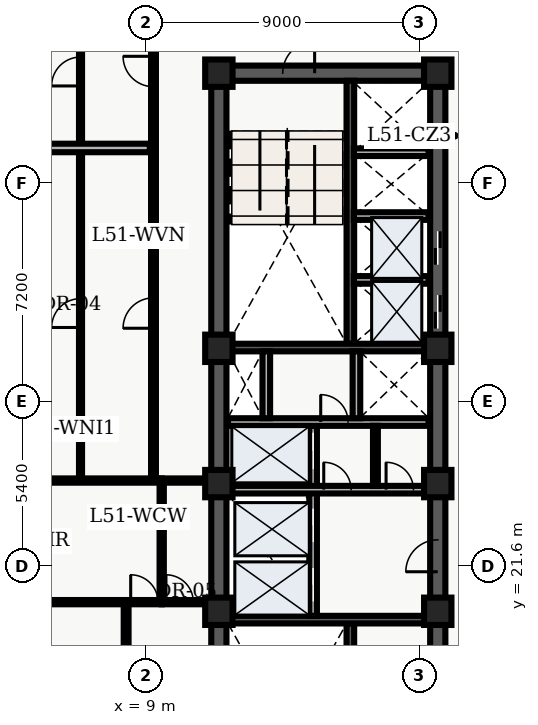
"""IFC4 building model, lengths in metres.
Left out: names, types, materials, properties, quantities, classifications, styles, units other than length and angle.
Written with IfcOpenShell. Run it as: python <this file> out.ifc"""

import sys

from ifc_helpers import new_model, entity, si_unit, converted_unit, direction, frame, origin_with_axes, origin_2d_with_axis, place, context, subcontext, project, spatial, polyline, rectangle, outline, extrude, element, fill, save


model = new_model("IFC4")
c1 = context("Model", 3, precision=1e-05, world=origin_with_axes(), true_north=direction((0.0, 1.0)))
c2 = subcontext(c1, "Body", "Model", "MODEL_VIEW")
j1 = project(units=[si_unit("LENGTHUNIT", "METRE"), converted_unit("PLANEANGLEUNIT", "DEGREE", entity("IfcPlaneAngleMeasure", 0.017), si_unit("PLANEANGLEUNIT", "RADIAN"), dimensions=[0, 0, 0, 0, 0, 0, 0])], contexts=[c1])
p1 = place(None, origin_with_axes())
s1 = spatial("IfcSite", under=j1, at=p1, CompositionType="ELEMENT")
p2 = place(p1, origin_with_axes())
s2 = spatial("IfcBuilding", under=s1, at=p2, CompositionType="ELEMENT")
p3 = place(p2, frame((0.0, 0.0, 208.2), z_axis=(0.0, 0.0, 1.0), x_axis=(1.0, 0.0, 0.0)))
s3 = spatial("IfcBuildingStorey", under=s2, at=p3, CompositionType="ELEMENT", Elevation=208.2)
p4 = place(p3, frame((11.4, 10.8, 0.0), z_axis=(0.0, 0.0, 1.0), x_axis=(0.0, 1.0, 0.0)))
e1 = element("IfcWall", 1, at=p4, inside=s3, PredefinedType="SHEAR", context=c2, shape_type="SweptSolid", body=[
    extrude(outline(polyline([(0.0, -0.25), (27.0, -0.25), (27.0, 0.25), (0.0, 0.25), (0.0, -0.25)])), origin_with_axes(), (0.0, 0.0, 1.0), 3.66),
])
p5 = place(p3, frame((11.4, 37.8, 0.0), z_axis=(0.0, 0.0, 1.0), x_axis=(1.0, 0.0, 0.0)))
e2 = element("IfcWall", 2, at=p5, inside=s3, PredefinedType="SHEAR", context=c2, shape_type="SweptSolid", body=[
    extrude(outline(polyline([(0.0, -0.25), (7.2, -0.25), (7.2, 0.25), (0.0, 0.25), (0.0, -0.25)])), origin_with_axes(), (0.0, 0.0, 1.0), 3.66),
])
p6 = place(p5, frame((2.625, 0.0, 0.0), z_axis=(0.0, 0.0, 1.0), x_axis=(1.0, 0.0, 0.0)))
e3 = element("IfcOpeningElement", 3, at=p6, cuts=e2, PredefinedType="OPENING", context=c2, shape_type="SweptSolid", body=[
    extrude(rectangle(XDim=1.05, YDim=0.52, at=origin_2d_with_axis()), origin_with_axes(), (0.0, 0.0, 1.0), 2.15),
])
p7 = place(p3, frame((18.6, 10.8, 0.0), z_axis=(0.0, 0.0, 1.0), x_axis=(0.0, 1.0, 0.0)))
e4 = element("IfcWall", 4, at=p7, inside=s3, PredefinedType="SHEAR", context=c2, shape_type="SweptSolid", body=[
    extrude(outline(polyline([(0.0, -0.25), (13.5, -0.25), (13.5, 0.25), (0.0, 0.25), (0.0, -0.25)])), origin_with_axes(), (0.0, 0.0, 1.0), 3.66),
])
p8 = place(p7, frame((11.125, 0.0, 0.0), z_axis=(0.0, 0.0, 1.0), x_axis=(1.0, 0.0, 0.0)))
e5 = element("IfcOpeningElement", 5, at=p8, cuts=e4, PredefinedType="OPENING", context=c2, shape_type="SweptSolid", body=[
    extrude(rectangle(XDim=1.05, YDim=0.52, at=origin_2d_with_axis()), origin_with_axes(), (0.0, 0.0, 1.0), 2.15),
])
p9 = place(p7, frame((2.425, 0.0, 0.0), z_axis=(0.0, 0.0, 1.0), x_axis=(1.0, 0.0, 0.0)))
e6 = element("IfcOpeningElement", 6, at=p9, cuts=e4, PredefinedType="OPENING", context=c2, shape_type="SweptSolid", body=[
    extrude(rectangle(XDim=1.05, YDim=0.52, at=origin_2d_with_axis()), origin_with_axes(), (0.0, 0.0, 1.0), 2.15),
])
p10 = place(p7, frame((6.725, 0.0, 0.0), z_axis=(0.0, 0.0, 1.0), x_axis=(1.0, 0.0, 0.0)))
e7 = element("IfcOpeningElement", 7, at=p10, cuts=e4, PredefinedType="OPENING", context=c2, shape_type="SweptSolid", body=[
    extrude(rectangle(XDim=1.05, YDim=0.52, at=origin_2d_with_axis()), origin_with_axes(), (0.0, 0.0, 1.0), 2.15),
])
p11 = place(p3, frame((18.6, 24.3, 0.0), z_axis=(0.0, 0.0, 1.0), x_axis=(0.0, 1.0, 0.0)))
e8 = element("IfcWall", 8, at=p11, inside=s3, PredefinedType="SHEAR", context=c2, shape_type="SweptSolid", body=[
    extrude(outline(polyline([(0.0, -0.25), (13.5, -0.25), (13.5, 0.25), (0.0, 0.25), (0.0, -0.25)])), origin_with_axes(), (0.0, 0.0, 1.0), 3.66),
])
p12 = place(p11, frame((5.65, 0.0, 0.0), z_axis=(0.0, 0.0, 1.0), x_axis=(1.0, 0.0, 0.0)))
e9 = element("IfcOpeningElement", 9, at=p12, cuts=e8, PredefinedType="OPENING", context=c2, shape_type="SweptSolid", body=[
    extrude(rectangle(XDim=1.1, YDim=0.52, at=origin_2d_with_axis()), origin_with_axes(), (0.0, 0.0, 1.0), 2.15),
])
p13 = place(p11, frame((7.75, 0.0, 0.0), z_axis=(0.0, 0.0, 1.0), x_axis=(1.0, 0.0, 0.0)))
e10 = element("IfcOpeningElement", 10, at=p13, cuts=e8, PredefinedType="OPENING", context=c2, shape_type="SweptSolid", body=[
    extrude(rectangle(XDim=1.1, YDim=0.52, at=origin_2d_with_axis()), origin_with_axes(), (0.0, 0.0, 1.0), 2.15),
])
p14 = place(p3, frame((15.725, 11.05, 0.0), z_axis=(0.0, 0.0, 1.0), x_axis=(0.0, 1.0, 0.0)))
e11 = element("IfcWall", 11, at=p14, inside=s3, PredefinedType="SHEAR", context=c2, shape_type="SweptSolid", body=[
    extrude(outline(polyline([(0.0, -0.125), (8.65, -0.125), (8.65, 0.125), (0.0, 0.125), (0.0, -0.125)])), origin_with_axes(), (0.0, 0.0, 1.0), 3.66),
])
p15 = place(p3, frame((11.65, 19.825, 0.0), z_axis=(0.0, 0.0, 1.0), x_axis=(1.0, 0.0, 0.0)))
e12 = element("IfcWall", 12, at=p15, inside=s3, PredefinedType="SHEAR", context=c2, shape_type="SweptSolid", body=[
    extrude(outline(polyline([(0.0, -0.125), (6.7, -0.125), (6.7, 0.125), (0.0, 0.125), (0.0, -0.125)])), origin_with_axes(), (0.0, 0.0, 1.0), 3.66),
])
p16 = place(p3, frame((15.725, 28.9, 0.0), z_axis=(0.0, 0.0, 1.0), x_axis=(0.0, 1.0, 0.0)))
e13 = element("IfcWall", 13, at=p16, inside=s3, PredefinedType="SHEAR", context=c2, shape_type="SweptSolid", body=[
    extrude(outline(polyline([(0.0, -0.125), (8.65, -0.125), (8.65, 0.125), (0.0, 0.125), (0.0, -0.125)])), origin_with_axes(), (0.0, 0.0, 1.0), 3.66),
])
p17 = place(p3, frame((11.65, 28.775, 0.0), z_axis=(0.0, 0.0, 1.0), x_axis=(1.0, 0.0, 0.0)))
e14 = element("IfcWall", 14, at=p17, inside=s3, PredefinedType="SHEAR", context=c2, shape_type="SweptSolid", body=[
    extrude(outline(polyline([(0.0, -0.125), (6.7, -0.125), (6.7, 0.125), (0.0, 0.125), (0.0, -0.125)])), origin_with_axes(), (0.0, 0.0, 1.0), 3.66),
])
p18 = place(p3, frame((14.5, 19.95, 0.0), z_axis=(0.0, 0.0, 1.0), x_axis=(0.0, 1.0, 0.0)))
e15 = element("IfcWall", 15, at=p18, inside=s3, PredefinedType="SOLIDWALL", context=c2, shape_type="SweptSolid", body=[
    extrude(outline(polyline([(0.0, -0.125), (6.25, -0.125), (6.25, 0.125), (0.0, 0.125), (0.0, -0.125)])), origin_with_axes(), (0.0, 0.0, 1.0), 2.7),
])
p19 = place(p18, frame((1.025, 0.0, 0.0), z_axis=(0.0, 0.0, 1.0), x_axis=(1.0, 0.0, 0.0)))
e16 = element("IfcOpeningElement", 16, at=p19, cuts=e15, PredefinedType="OPENING", context=c2, shape_type="SweptSolid", body=[
    extrude(rectangle(XDim=1.1, YDim=0.27, at=origin_2d_with_axis()), origin_with_axes(), (0.0, 0.0, 1.0), 2.15),
])
p20 = place(p18, frame((2.975, 0.0, 0.0), z_axis=(0.0, 0.0, 1.0), x_axis=(1.0, 0.0, 0.0)))
e17 = element("IfcOpeningElement", 17, at=p20, cuts=e15, PredefinedType="OPENING", context=c2, shape_type="SweptSolid", body=[
    extrude(rectangle(XDim=1.1, YDim=0.27, at=origin_2d_with_axis()), origin_with_axes(), (0.0, 0.0, 1.0), 2.15),
])
p21 = place(p18, frame((5.425, 0.0, 0.0), z_axis=(0.0, 0.0, 1.0), x_axis=(1.0, 0.0, 0.0)))
e18 = element("IfcOpeningElement", 18, at=p21, cuts=e15, PredefinedType="OPENING", context=c2, shape_type="SweptSolid", body=[
    extrude(rectangle(XDim=1.2, YDim=0.27, at=origin_2d_with_axis()), origin_with_axes(), (0.0, 0.0, 1.0), 2.15),
])
p22 = place(p3, frame((11.7, 24.1, 0.0), z_axis=(0.0, 0.0, 1.0), x_axis=(1.0, 0.0, 0.0)))
e19 = element("IfcWall", 19, at=p22, inside=s3, PredefinedType="SOLIDWALL", context=c2, shape_type="SweptSolid", body=[
    extrude(outline(polyline([(0.0, -0.125), (6.6, -0.125), (6.6, 0.125), (0.0, 0.125), (0.0, -0.125)])), origin_with_axes(), (0.0, 0.0, 1.0), 2.7),
])
p23 = place(p22, frame((3.6, 0.0, 0.0), z_axis=(0.0, 0.0, 1.0), x_axis=(1.0, 0.0, 0.0)))
e20 = element("IfcOpeningElement", 20, at=p23, cuts=e19, PredefinedType="OPENING", context=c2, shape_type="SweptSolid", body=[
    extrude(rectangle(XDim=0.9, YDim=0.27, at=origin_2d_with_axis()), origin_with_axes(), (0.0, 0.0, 1.0), 2.15),
])
p24 = place(p22, frame((5.65, 0.0, 0.0), z_axis=(0.0, 0.0, 1.0), x_axis=(1.0, 0.0, 0.0)))
e21 = element("IfcOpeningElement", 21, at=p24, cuts=e19, PredefinedType="OPENING", context=c2, shape_type="SweptSolid", body=[
    extrude(rectangle(XDim=0.9, YDim=0.27, at=origin_2d_with_axis()), origin_with_axes(), (0.0, 0.0, 1.0), 2.15),
])
p25 = place(p3, frame((11.7, 26.325, 0.0), z_axis=(0.0, 0.0, 1.0), x_axis=(1.0, 0.0, 0.0)))
e22 = element("IfcWall", 22, at=p25, inside=s3, PredefinedType="SOLIDWALL", context=c2, shape_type="SweptSolid", body=[
    extrude(outline(polyline([(0.0, -0.125), (6.6, -0.125), (6.6, 0.125), (0.0, 0.125), (0.0, -0.125)])), origin_with_axes(), (0.0, 0.0, 1.0), 2.7),
])
p26 = place(p25, frame((3.5, 0.0, 0.0), z_axis=(0.0, 0.0, 1.0), x_axis=(1.0, 0.0, 0.0)))
e23 = element("IfcOpeningElement", 23, at=p26, cuts=e22, PredefinedType="OPENING", context=c2, shape_type="SweptSolid", body=[
    extrude(rectangle(XDim=0.9, YDim=0.27, at=origin_2d_with_axis()), origin_with_axes(), (0.0, 0.0, 1.0), 2.15),
])
for number, where, z_axis, x_axis in (
    (24, (12.96, 26.45, 0.0), (0.0, 0.0, 1.0), (0.0, 1.0, 0.0)),
    (25, (15.925, 26.45, 0.0), (0.0, 0.0, 1.0), (0.0, 1.0, 0.0)),
):
    element("IfcWall", number, at=place(p3, frame(where, z_axis=z_axis, x_axis=x_axis)), inside=s3, PredefinedType="SOLIDWALL", context=c2, shape_type="SweptSolid", body=[
        extrude(outline(polyline([(0.0, -0.125), (2.2, -0.125), (2.2, 0.125), (0.0, 0.125), (0.0, -0.125)])), origin_with_axes(), (0.0, 0.0, 1.0), 2.7),
    ])
for number, where, z_axis, x_axis in (
    (26, (11.4, 20.1, 0.0), (0.0, 0.0, 1.0), (1.0, 0.0, 0.0)),
    (27, (11.4, 24.3, 0.0), (0.0, 0.0, 1.0), (1.0, 0.0, 0.0)),
    (28, (11.4, 28.75, 0.0), (0.0, 0.0, 1.0), (1.0, 0.0, 0.0)),
    (29, (11.4, 37.8, 0.0), (0.0, 0.0, 1.0), (1.0, 0.0, 0.0)),
    (30, (18.6, 20.1, 0.0), (0.0, 0.0, 1.0), (1.0, 0.0, 0.0)),
    (31, (18.6, 24.3, 0.0), (0.0, 0.0, 1.0), (1.0, 0.0, 0.0)),
    (32, (18.6, 28.75, 0.0), (0.0, 0.0, 1.0), (1.0, 0.0, 0.0)),
    (33, (18.6, 37.8, 0.0), (0.0, 0.0, 1.0), (1.0, 0.0, 0.0)),
):
    element("IfcColumn", number, at=place(p3, frame(where, z_axis=z_axis, x_axis=x_axis)), inside=s3, PredefinedType="COLUMN", context=c2, shape_type="SweptSolid", body=[
        extrude(rectangle(XDim=0.9, YDim=0.9, at=origin_2d_with_axis()), origin_with_axes(), (0.0, 0.0, 1.0), 3.9),
    ])
p27 = place(p3, frame((16.55, 24.22, 0.0), z_axis=(0.0, 0.0, 1.0), x_axis=(0.0, 1.0, 0.0)))
e34 = element("IfcWall", 34, at=p27, inside=s3, PredefinedType="PARTITIONING", context=c2, shape_type="SweptSolid", body=[
    extrude(outline(polyline([(0.0, -0.08), (1.98, -0.08), (1.98, 0.08), (0.0, 0.08), (0.0, -0.08)])), origin_with_axes(), (0.0, 0.0, 1.0), 2.7),
])
for number, where, z_axis, x_axis in (
    (35, (15.84, 31.0, 0.0), (0.0, 0.0, 1.0), (1.0, 0.0, 0.0)),
    (36, (15.84, 33.1, 0.0), (0.0, 0.0, 1.0), (1.0, 0.0, 0.0)),
    (37, (15.84, 35.2, 0.0), (0.0, 0.0, 1.0), (1.0, 0.0, 0.0)),
):
    element("IfcWall", number, at=place(p3, frame(where, z_axis=z_axis, x_axis=x_axis)), inside=s3, PredefinedType="SOLIDWALL", context=c2, shape_type="SweptSolid", body=[
        extrude(outline(polyline([(0.0, -0.125), (2.46, -0.125), (2.46, 0.125), (0.0, 0.125), (0.0, -0.125)])), origin_with_axes(), (0.0, 0.0, 1.0), 2.7),
    ])
p28 = place(p3, frame((9.52, 20.4, 0.0), z_axis=(0.0, 0.0, 1.0), x_axis=(0.0, 1.0, 0.0)))
e38 = element("IfcWall", 38, at=p28, inside=s3, PredefinedType="PARTITIONING", context=c2, shape_type="SweptSolid", body=[
    extrude(outline(polyline([(0.0, -0.07), (4.0, -0.07), (4.0, 0.07), (0.0, 0.07), (0.0, -0.07)])), origin_with_axes(), (0.0, 0.0, 1.0), 2.7),
])
p29 = place(p3, frame((9.52, 20.4, 0.0), z_axis=(0.0, 0.0, 1.0), x_axis=(1.0, 0.0, 0.0)))
e39 = element("IfcWall", 39, at=p29, inside=s3, PredefinedType="PARTITIONING", context=c2, shape_type="SweptSolid", body=[
    extrude(outline(polyline([(0.0, -0.07), (1.58, -0.07), (1.58, 0.07), (0.0, 0.07), (0.0, -0.07)])), origin_with_axes(), (0.0, 0.0, 1.0), 2.7),
])
p30 = place(p29, frame((0.59, 0.0, 0.0), z_axis=(0.0, 0.0, 1.0), x_axis=(1.0, 0.0, 0.0)))
e40 = element("IfcOpeningElement", 40, at=p30, cuts=e39, PredefinedType="OPENING", context=c2, shape_type="SweptSolid", body=[
    extrude(rectangle(XDim=0.9, YDim=0.16, at=origin_2d_with_axis()), origin_with_axes(), (0.0, 0.0, 1.0), 2.15),
])
p31 = place(p3, frame((9.52, 24.4, 0.0), z_axis=(0.0, 0.0, 1.0), x_axis=(1.0, 0.0, 0.0)))
e41 = element("IfcWall", 41, at=p31, inside=s3, PredefinedType="PARTITIONING", context=c2, shape_type="SweptSolid", body=[
    extrude(outline(polyline([(0.0, -0.07), (1.58, -0.07), (1.58, 0.07), (0.0, 0.07), (0.0, -0.07)])), origin_with_axes(), (0.0, 0.0, 1.0), 2.7),
])
p32 = place(p3, frame((8.35, 7.8, 0.0), z_axis=(0.0, 0.0, 1.0), x_axis=(0.0, 1.0, 0.0)))
e42 = element("IfcWall", 42, at=p32, inside=s3, PredefinedType="PARTITIONING", context=c2, shape_type="SweptSolid", body=[
    extrude(outline(polyline([(0.0, -0.08), (12.6, -0.08), (12.6, 0.08), (0.0, 0.08), (0.0, -0.08)])), origin_with_axes(), (0.0, 0.0, 1.0), 2.7),
])
p33 = place(p32, frame((2.92, 0.0, 0.0), z_axis=(0.0, 0.0, 1.0), x_axis=(1.0, 0.0, 0.0)))
e43 = element("IfcOpeningElement", 43, at=p33, cuts=e42, PredefinedType="OPENING", context=c2, shape_type="SweptSolid", body=[
    extrude(rectangle(XDim=1.0, YDim=0.18, at=origin_2d_with_axis()), origin_with_axes(), (0.0, 0.0, 1.0), 2.15),
])
p34 = place(p32, frame((9.115, 0.0, 0.0), z_axis=(0.0, 0.0, 1.0), x_axis=(1.0, 0.0, 0.0)))
e44 = element("IfcOpeningElement", 44, at=p34, cuts=e42, PredefinedType="OPENING", context=c2, shape_type="SweptSolid", body=[
    extrude(rectangle(XDim=1.0, YDim=0.18, at=origin_2d_with_axis()), origin_with_axes(), (0.0, 0.0, 1.0), 2.15),
])
p35 = place(p3, frame((9.25, 24.4, 0.0), z_axis=(0.0, 0.0, 1.0), x_axis=(0.0, 1.0, 0.0)))
e45 = element("IfcWall", 45, at=p35, inside=s3, PredefinedType="PARTITIONING", context=c2, shape_type="SweptSolid", body=[
    extrude(outline(polyline([(0.0, -0.08), (16.1, -0.08), (16.1, 0.08), (0.0, 0.08), (0.0, -0.08)])), origin_with_axes(), (0.0, 0.0, 1.0), 2.7),
])
p36 = place(p35, frame((5.51, 0.0, 0.0), z_axis=(0.0, 0.0, 1.0), x_axis=(1.0, 0.0, 0.0)))
e46 = element("IfcOpeningElement", 46, at=p36, cuts=e45, PredefinedType="OPENING", context=c2, shape_type="SweptSolid", body=[
    extrude(rectangle(XDim=1.0, YDim=0.18, at=origin_2d_with_axis()), origin_with_axes(), (0.0, 0.0, 1.0), 2.15),
])
p37 = place(p35, frame((13.455, 0.0, 0.0), z_axis=(0.0, 0.0, 1.0), x_axis=(1.0, 0.0, 0.0)))
e47 = element("IfcOpeningElement", 47, at=p37, cuts=e45, PredefinedType="OPENING", context=c2, shape_type="SweptSolid", body=[
    extrude(rectangle(XDim=1.0, YDim=0.18, at=origin_2d_with_axis()), origin_with_axes(), (0.0, 0.0, 1.0), 2.15),
])
p38 = place(p3, frame((0.335, 20.4, 0.0), z_axis=(0.0, 0.0, 1.0), x_axis=(1.0, 0.0, 0.0)))
e48 = element("IfcWall", 48, at=p38, inside=s3, PredefinedType="PARTITIONING", context=c2, shape_type="SweptSolid", body=[
    extrude(outline(polyline([(0.0, -0.07), (9.185, -0.07), (9.185, 0.07), (0.0, 0.07), (0.0, -0.07)])), origin_with_axes(), (0.0, 0.0, 1.0), 2.7),
])
p39 = place(p38, frame((8.615, 0.0, 0.0), z_axis=(0.0, 0.0, 1.0), x_axis=(1.0, 0.0, 0.0)))
e49 = element("IfcOpeningElement", 49, at=p39, cuts=e48, PredefinedType="OPENING", context=c2, shape_type="SweptSolid", body=[
    extrude(rectangle(XDim=0.9, YDim=0.16, at=origin_2d_with_axis()), origin_with_axes(), (0.0, 0.0, 1.0), 2.15),
])
p40 = place(p3, frame((0.335, 24.4, 0.0), z_axis=(0.0, 0.0, 1.0), x_axis=(1.0, 0.0, 0.0)))
e50 = element("IfcWall", 50, at=p40, inside=s3, PredefinedType="PARTITIONING", context=c2, shape_type="SweptSolid", body=[
    extrude(outline(polyline([(0.0, -0.07), (9.185, -0.07), (9.185, 0.07), (0.0, 0.07), (0.0, -0.07)])), origin_with_axes(), (0.0, 0.0, 1.0), 2.7),
])
p41 = place(p3, frame((6.85, 24.55, 0.0), z_axis=(0.0, 0.0, 1.0), x_axis=(0.0, 1.0, 0.0)))
e51 = element("IfcWall", 51, at=p41, inside=s3, PredefinedType="PARTITIONING", context=c2, shape_type="SweptSolid", body=[
    extrude(outline(polyline([(0.0, -0.05), (15.75, -0.05), (15.75, 0.05), (0.0, 0.05), (0.0, -0.05)])), origin_with_axes(), (0.0, 0.0, 1.0), 2.7),
])
p42 = place(p41, frame((5.36, 0.0, 0.0), z_axis=(0.0, 0.0, 1.0), x_axis=(1.0, 0.0, 0.0)))
e52 = element("IfcOpeningElement", 52, at=p42, cuts=e51, PredefinedType="OPENING", context=c2, shape_type="SweptSolid", body=[
    extrude(rectangle(XDim=0.95, YDim=0.12, at=origin_2d_with_axis()), origin_with_axes(), (0.0, 0.0, 1.0), 2.15),
])
p43 = place(p41, frame((13.305, 0.0, 0.0), z_axis=(0.0, 0.0, 1.0), x_axis=(1.0, 0.0, 0.0)))
e53 = element("IfcOpeningElement", 53, at=p43, cuts=e51, PredefinedType="OPENING", context=c2, shape_type="SweptSolid", body=[
    extrude(rectangle(XDim=0.95, YDim=0.12, at=origin_2d_with_axis()), origin_with_axes(), (0.0, 0.0, 1.0), 2.15),
])
p44 = place(p3, frame((0.335, 35.34, 0.0), z_axis=(0.0, 0.0, 1.0), x_axis=(1.0, 0.0, 0.0)))
e54 = element("IfcWall", 54, at=p44, inside=s3, PredefinedType="PARTITIONING", context=c2, shape_type="SweptSolid", body=[
    extrude(outline(polyline([(0.0, -0.14), (8.795, -0.14), (8.795, 0.14), (0.0, 0.14), (0.0, -0.14)])), origin_with_axes(), (0.0, 0.0, 1.0), 2.7),
])
p45 = place(p11, frame((5.65, 0.0, 0.0), z_axis=(0.0, 0.0, 1.0), x_axis=(1.0, 0.0, 0.0)))
e55 = element("IfcDoor", 55, at=p45, inside=s3, OperationType="SLIDING_TO_LEFT", PredefinedType="DOOR", context=c2, shape_type="SweptSolid", body=[
    extrude(rectangle(XDim=1.1, YDim=0.09, at=origin_2d_with_axis()), origin_with_axes(), (0.0, 0.0, 1.0), 2.15),
])
fill(e9, e55)
p46 = place(p11, frame((7.75, 0.0, 0.0), z_axis=(0.0, 0.0, 1.0), x_axis=(1.0, 0.0, 0.0)))
e56 = element("IfcDoor", 56, at=p46, inside=s3, OperationType="SLIDING_TO_RIGHT", PredefinedType="DOOR", context=c2, shape_type="SweptSolid", body=[
    extrude(rectangle(XDim=1.1, YDim=0.09, at=origin_2d_with_axis()), origin_with_axes(), (0.0, 0.0, 1.0), 2.15),
])
fill(e10, e56)
p47 = place(p18, frame((1.025, 0.0, 0.0), z_axis=(0.0, 0.0, 1.0), x_axis=(1.0, 0.0, 0.0)))
e57 = element("IfcDoor", 57, at=p47, inside=s3, OperationType="SLIDING_TO_LEFT", PredefinedType="DOOR", context=c2, shape_type="SweptSolid", body=[
    extrude(rectangle(XDim=1.1, YDim=0.09, at=origin_2d_with_axis()), origin_with_axes(), (0.0, 0.0, 1.0), 2.15),
])
fill(e16, e57)
p48 = place(p18, frame((2.975, 0.0, 0.0), z_axis=(0.0, 0.0, 1.0), x_axis=(1.0, 0.0, 0.0)))
e58 = element("IfcDoor", 58, at=p48, inside=s3, OperationType="SLIDING_TO_RIGHT", PredefinedType="DOOR", context=c2, shape_type="SweptSolid", body=[
    extrude(rectangle(XDim=1.1, YDim=0.09, at=origin_2d_with_axis()), origin_with_axes(), (0.0, 0.0, 1.0), 2.15),
])
fill(e17, e58)
p49 = place(p18, frame((5.425, 0.0, 0.0), z_axis=(0.0, 0.0, 1.0), x_axis=(1.0, 0.0, 0.0)))
e59 = element("IfcDoor", 59, at=p49, inside=s3, OperationType="DOUBLE_DOOR_SLIDING", PredefinedType="DOOR", context=c2, shape_type="SweptSolid", body=[
    extrude(rectangle(XDim=1.2, YDim=0.09, at=origin_2d_with_axis()), origin_with_axes(), (0.0, 0.0, 1.0), 2.15),
])
fill(e18, e59)
p50 = place(p5, frame((2.625, 0.0, 0.0), z_axis=(0.0, 0.0, 1.0), x_axis=(1.0, 0.0, 0.0)))
e60 = element("IfcDoor", 60, at=p50, inside=s3, OperationType="SINGLE_SWING_RIGHT", PredefinedType="DOOR", context=c2, shape_type="SweptSolid", body=[
    extrude(rectangle(XDim=1.05, YDim=0.09, at=origin_2d_with_axis()), origin_with_axes(), (0.0, 0.0, 1.0), 2.15),
])
fill(e3, e60)
p51 = place(p7, frame((11.125, 0.0, 0.0), z_axis=(0.0, 0.0, 1.0), x_axis=(1.0, 0.0, 0.0)))
e61 = element("IfcDoor", 61, at=p51, inside=s3, OperationType="SINGLE_SWING_LEFT", PredefinedType="DOOR", context=c2, shape_type="SweptSolid", body=[
    extrude(rectangle(XDim=1.05, YDim=0.09, at=origin_2d_with_axis()), origin_with_axes(), (0.0, 0.0, 1.0), 2.15),
])
fill(e5, e61)
p52 = place(p22, frame((3.6, 0.0, 0.0), z_axis=(0.0, 0.0, 1.0), x_axis=(1.0, 0.0, 0.0)))
e62 = element("IfcDoor", 62, at=p52, inside=s3, OperationType="SINGLE_SWING_LEFT", PredefinedType="DOOR", context=c2, shape_type="SweptSolid", body=[
    extrude(rectangle(XDim=0.9, YDim=0.09, at=origin_2d_with_axis()), origin_with_axes(), (0.0, 0.0, 1.0), 2.15),
])
fill(e20, e62)
p53 = place(p22, frame((5.65, 0.0, 0.0), z_axis=(0.0, 0.0, 1.0), x_axis=(1.0, 0.0, 0.0)))
e63 = element("IfcDoor", 63, at=p53, inside=s3, OperationType="SINGLE_SWING_LEFT", PredefinedType="DOOR", context=c2, shape_type="SweptSolid", body=[
    extrude(rectangle(XDim=0.9, YDim=0.09, at=origin_2d_with_axis()), origin_with_axes(), (0.0, 0.0, 1.0), 2.15),
])
fill(e21, e63)
p54 = place(p25, frame((3.5, 0.0, 0.0), z_axis=(0.0, 0.0, 1.0), x_axis=(1.0, 0.0, 0.0)))
e64 = element("IfcDoor", 64, at=p54, inside=s3, OperationType="SINGLE_SWING_LEFT", PredefinedType="DOOR", context=c2, shape_type="SweptSolid", body=[
    extrude(rectangle(XDim=0.9, YDim=0.09, at=origin_2d_with_axis()), origin_with_axes(), (0.0, 0.0, 1.0), 2.15),
])
fill(e23, e64)
p55 = place(p29, frame((0.59, 0.0, 0.0), z_axis=(0.0, 0.0, 1.0), x_axis=(1.0, 0.0, 0.0)))
e65 = element("IfcDoor", 65, at=p55, inside=s3, OperationType="SINGLE_SWING_LEFT", PredefinedType="DOOR", context=c2, shape_type="SweptSolid", body=[
    extrude(rectangle(XDim=0.9, YDim=0.084, at=origin_2d_with_axis()), origin_with_axes(), (0.0, 0.0, 1.0), 2.15),
])
fill(e40, e65)
p56 = place(p38, frame((8.615, 0.0, 0.0), z_axis=(0.0, 0.0, 1.0), x_axis=(1.0, 0.0, 0.0)))
e66 = element("IfcDoor", 66, at=p56, inside=s3, OperationType="SINGLE_SWING_LEFT", PredefinedType="DOOR", context=c2, shape_type="SweptSolid", body=[
    extrude(rectangle(XDim=0.9, YDim=0.084, at=origin_2d_with_axis()), origin_with_axes(), (0.0, 0.0, 1.0), 2.15),
])
fill(e49, e66)
p57 = place(p41, frame((5.36, 0.0, 0.0), z_axis=(0.0, 0.0, 1.0), x_axis=(1.0, 0.0, 0.0)))
e67 = element("IfcDoor", 67, at=p57, inside=s3, OperationType="SINGLE_SWING_LEFT", PredefinedType="DOOR", context=c2, shape_type="SweptSolid", body=[
    extrude(rectangle(XDim=0.95, YDim=0.06, at=origin_2d_with_axis()), origin_with_axes(), (0.0, 0.0, 1.0), 2.15),
])
fill(e52, e67)
p58 = place(p35, frame((5.51, 0.0, 0.0), z_axis=(0.0, 0.0, 1.0), x_axis=(1.0, 0.0, 0.0)))
e68 = element("IfcDoor", 68, at=p58, inside=s3, OperationType="SINGLE_SWING_LEFT", PredefinedType="DOOR", context=c2, shape_type="SweptSolid", body=[
    extrude(rectangle(XDim=1.0, YDim=0.09, at=origin_2d_with_axis()), origin_with_axes(), (0.0, 0.0, 1.0), 2.15),
])
fill(e46, e68)
p59 = place(p41, frame((13.305, 0.0, 0.0), z_axis=(0.0, 0.0, 1.0), x_axis=(1.0, 0.0, 0.0)))
e69 = element("IfcDoor", 69, at=p59, inside=s3, OperationType="SINGLE_SWING_LEFT", PredefinedType="DOOR", context=c2, shape_type="SweptSolid", body=[
    extrude(rectangle(XDim=0.95, YDim=0.06, at=origin_2d_with_axis()), origin_with_axes(), (0.0, 0.0, 1.0), 2.15),
])
fill(e53, e69)
p60 = place(p35, frame((13.455, 0.0, 0.0), z_axis=(0.0, 0.0, 1.0), x_axis=(1.0, 0.0, 0.0)))
e70 = element("IfcDoor", 70, at=p60, inside=s3, OperationType="SINGLE_SWING_RIGHT", PredefinedType="DOOR", context=c2, shape_type="SweptSolid", body=[
    extrude(rectangle(XDim=1.0, YDim=0.09, at=origin_2d_with_axis()), origin_with_axes(), (0.0, 0.0, 1.0), 2.15),
])
fill(e47, e70)
save(model, sys.argv[1])
